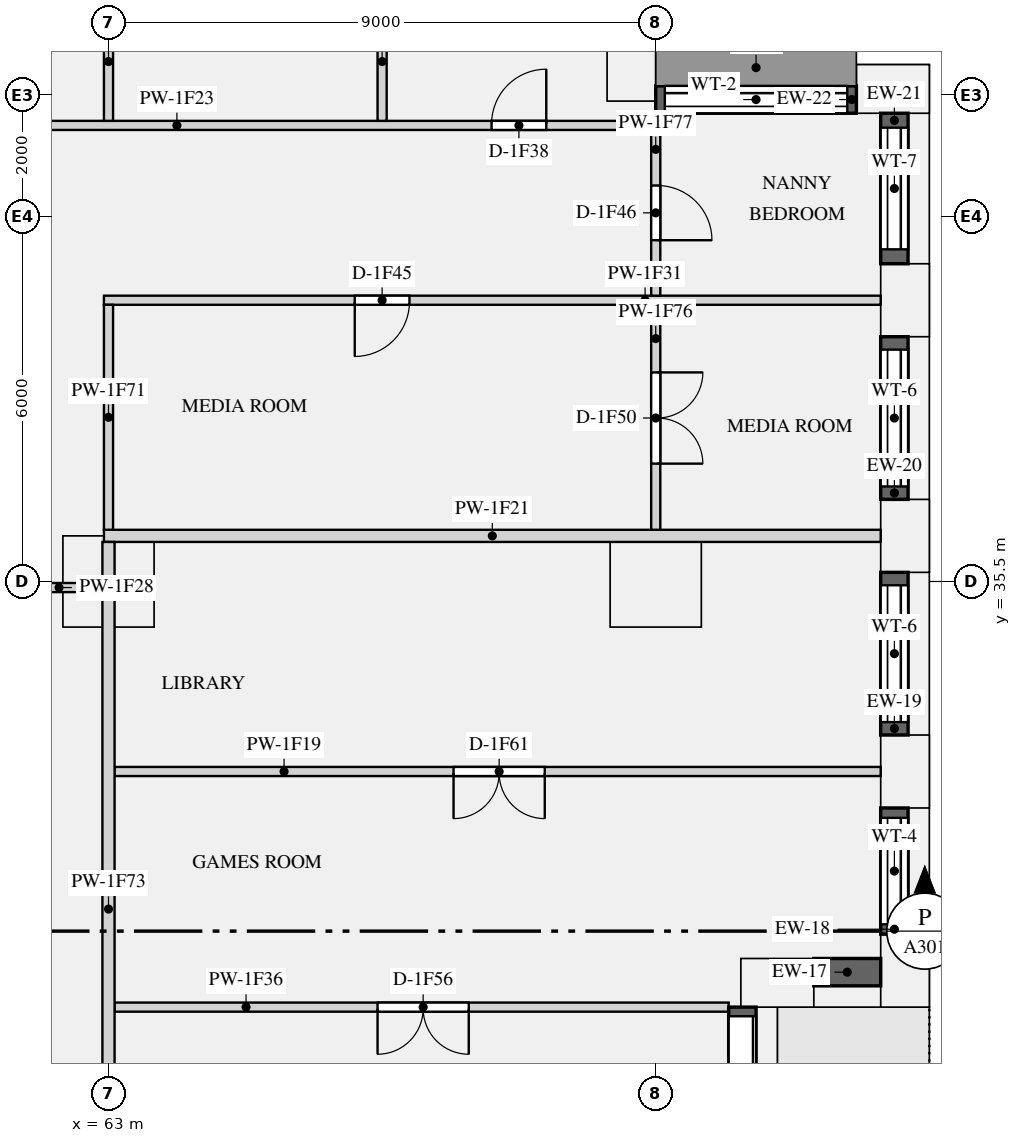
"""IFC4 building model, lengths in metres.
Left out: names, types, materials, properties, quantities, classifications, styles, units other than length and angle.
Written with IfcOpenShell. Run it as: python <this file> out.ifc"""

import sys

from ifc_helpers import new_model, si_unit, direction, frame, frame_2d, origin, origin_2d, place, context, subcontext, project, spatial, rectangle, extrude, element, fill, save


model = new_model("IFC4")
c1 = context("Model", 3, precision=1e-05, world=origin(), true_north=direction((0.0, 1.0)))
c2 = subcontext(c1, "Body", "Model", "MODEL_VIEW")
j1 = project(units=[si_unit("LENGTHUNIT", "METRE"), si_unit("PLANEANGLEUNIT", "RADIAN")], contexts=[c1])
p1 = place(None, origin())
s1 = spatial("IfcSite", under=j1, at=p1, CompositionType="ELEMENT")
p2 = place(p1, origin())
s2 = spatial("IfcBuilding", under=s1, at=p2, CompositionType="ELEMENT")
p3 = place(p2, frame((0.0, 0.0, 60.45)))
s3 = spatial("IfcBuildingStorey", under=s2, at=p3, CompositionType="ELEMENT", Elevation=60.45)
for number, where, z_axis, x_axis in (
    (1, (74.0, 28.9, 0.0), (0.0, 0.0, 1.0), (1.0, 0.0, 0.0)),
    (2, (76.1, 29.1, 0.0), (0.0, 0.0, 1.0), (0.0, 1.0, 0.0)),
    (3, (76.1, 32.375, 0.0), (0.0, 0.0, 1.0), (0.0, 1.0, 0.0)),
    (4, (76.1, 36.25, 0.0), (0.0, 0.0, 1.0), (0.0, 1.0, 0.0)),
    (5, (76.1, 40.125, 0.0), (0.0, 0.0, 1.0), (0.0, 1.0, 0.0)),
    (6, (75.9, 43.6, 0.0), (0.0, 0.0, 1.0), (-1.0, 0.0, 0.0)),
    (7, (71.6, 44.0, 0.0), (0.0, 0.0, 1.0), (0.0, 1.0, 0.0)),
):
    element("IfcColumn", number, at=place(p3, frame(where, z_axis=z_axis, x_axis=x_axis)), inside=s3, PredefinedType="USERDEFINED", context=c2, shape_type="SweptSolid", body=[
        extrude(rectangle(XDim=1.2, YDim=0.8, at=origin_2d()), origin(), (0.0, 0.0, 1.0), 3.15),
    ])
for number, where, z_axis, x_axis in (
    (8, (63.0, 35.5, 0.0), (0.0, 0.0, 1.0), (1.0, 0.0, 0.0)),
    (9, (72.0, 35.5, 0.0), (0.0, 0.0, 1.0), (1.0, 0.0, 0.0)),
):
    element("IfcColumn", number, at=place(p3, frame(where, z_axis=z_axis, x_axis=x_axis)), inside=s3, PredefinedType="COLUMN", context=c2, shape_type="SweptSolid", body=[
        extrude(rectangle(XDim=1.5, YDim=1.5, at=origin_2d()), origin(), (0.0, 0.0, 1.0), 3.15),
    ])
p4 = place(p3, frame((73.425, 25.1, 0.0), z_axis=(0.0, 0.0, 1.0), x_axis=(0.0, 1.0, 0.0)))
e10 = element("IfcWall", 10, at=p4, inside=s3, PredefinedType="SOLIDWALL", context=c2, shape_type="SweptSolid", body=[
    extrude(rectangle(XDim=3.4, YDim=0.45, at=frame_2d((1.7, 0.0))), origin(), (0.0, 0.0, 1.0), 2.83),
])
p5 = place(p4, frame((0.15, 0.0, 0.0)))
e11 = element("IfcOpeningElement", 11, at=p5, cuts=e10, PredefinedType="OPENING", context=c2, shape_type="SweptSolid", body=[
    extrude(rectangle(XDim=3.1, YDim=2.3, at=frame_2d((1.55, 1.15))), frame((0.0, 0.235, 0.0), z_axis=(0.0, -1.0, 0.0), x_axis=(1.0, 0.0, 0.0)), (0.0, 0.0, 1.0), 0.47),
])
p6 = place(p3, frame((74.6, 29.075, 0.9), z_axis=(0.0, 0.0, 1.0), x_axis=(1.0, 0.0, 0.0)))
e12 = element("IfcWall", 12, at=p6, inside=s3, PredefinedType="SOLIDWALL", context=c2, shape_type="SweptSolid", body=[
    extrude(rectangle(XDim=1.1, YDim=0.45, at=frame_2d((0.55, 0.0))), origin(), (0.0, 0.0, 1.0), 1.93),
])
p7 = place(p3, frame((75.925, 29.7, 0.9), z_axis=(0.0, 0.0, 1.0), x_axis=(0.0, 1.0, 0.0)))
e13 = element("IfcWall", 13, at=p7, inside=s3, PredefinedType="SOLIDWALL", context=c2, shape_type="SweptSolid", body=[
    extrude(rectangle(XDim=2.075, YDim=0.45, at=frame_2d((1.038, 0.0))), origin(), (0.0, 0.0, 1.0), 1.93),
])
p8 = place(p7, frame((0.163, 0.0, 0.15)))
e14 = element("IfcOpeningElement", 14, at=p8, cuts=e13, PredefinedType="OPENING", context=c2, shape_type="SweptSolid", body=[
    extrude(rectangle(XDim=1.75, YDim=1.5, at=frame_2d((0.875, 0.75))), frame((0.0, 0.235, 0.0), z_axis=(0.0, -1.0, 0.0), x_axis=(1.0, 0.0, 0.0)), (0.0, 0.0, 1.0), 0.47),
])
p9 = place(p3, frame((75.925, 32.975, 0.9), z_axis=(0.0, 0.0, 1.0), x_axis=(0.0, 1.0, 0.0)))
e15 = element("IfcWall", 15, at=p9, inside=s3, PredefinedType="SOLIDWALL", context=c2, shape_type="SweptSolid", body=[
    extrude(rectangle(XDim=2.675, YDim=0.45, at=frame_2d((1.337, 0.0))), origin(), (0.0, 0.0, 1.0), 1.93),
])
p10 = place(p9, frame((0.212, 0.0, 0.15)))
e16 = element("IfcOpeningElement", 16, at=p10, cuts=e15, PredefinedType="OPENING", context=c2, shape_type="SweptSolid", body=[
    extrude(rectangle(XDim=2.25, YDim=1.5, at=frame_2d((1.125, 0.75))), frame((0.0, 0.235, 0.0), z_axis=(0.0, -1.0, 0.0), x_axis=(1.0, 0.0, 0.0)), (0.0, 0.0, 1.0), 0.47),
])
p11 = place(p3, frame((75.925, 36.85, 0.9), z_axis=(0.0, 0.0, 1.0), x_axis=(0.0, 1.0, 0.0)))
e17 = element("IfcWall", 17, at=p11, inside=s3, PredefinedType="SOLIDWALL", context=c2, shape_type="SweptSolid", body=[
    extrude(rectangle(XDim=2.675, YDim=0.45, at=frame_2d((1.337, 0.0))), origin(), (0.0, 0.0, 1.0), 1.93),
])
p12 = place(p11, frame((0.212, 0.0, 0.15)))
e18 = element("IfcOpeningElement", 18, at=p12, cuts=e17, PredefinedType="OPENING", context=c2, shape_type="SweptSolid", body=[
    extrude(rectangle(XDim=2.25, YDim=1.5, at=frame_2d((1.125, 0.75))), frame((0.0, 0.235, 0.0), z_axis=(0.0, -1.0, 0.0), x_axis=(1.0, 0.0, 0.0)), (0.0, 0.0, 1.0), 0.47),
])
p13 = place(p3, frame((75.925, 40.725, 0.9), z_axis=(0.0, 0.0, 1.0), x_axis=(0.0, 1.0, 0.0)))
e19 = element("IfcWall", 19, at=p13, inside=s3, PredefinedType="SOLIDWALL", context=c2, shape_type="SweptSolid", body=[
    extrude(rectangle(XDim=2.475, YDim=0.45, at=frame_2d((1.237, 0.0))), origin(), (0.0, 0.0, 1.0), 1.93),
])
p14 = place(p13, frame((0.238, 0.0, 0.15)))
e20 = element("IfcOpeningElement", 20, at=p14, cuts=e19, PredefinedType="OPENING", context=c2, shape_type="SweptSolid", body=[
    extrude(rectangle(XDim=2.0, YDim=1.5, at=frame_2d((1.0, 0.75))), frame((0.0, 0.235, 0.0), z_axis=(0.0, -1.0, 0.0), x_axis=(1.0, 0.0, 0.0)), (0.0, 0.0, 1.0), 0.47),
])
p15 = place(p3, frame((75.3, 43.425, 0.9), z_axis=(0.0, 0.0, 1.0), x_axis=(-1.0, 0.0, 0.0)))
e21 = element("IfcWall", 21, at=p15, inside=s3, PredefinedType="SOLIDWALL", context=c2, shape_type="SweptSolid", body=[
    extrude(rectangle(XDim=3.3, YDim=0.45, at=frame_2d((1.65, 0.0))), origin(), (0.0, 0.0, 1.0), 1.93),
])
p16 = place(p15, frame((0.15, 0.0, 0.15)))
e22 = element("IfcOpeningElement", 22, at=p16, cuts=e21, PredefinedType="OPENING", context=c2, shape_type="SweptSolid", body=[
    extrude(rectangle(XDim=3.0, YDim=1.5, at=frame_2d((1.5, 0.75))), frame((0.0, 0.235, 0.0), z_axis=(0.0, -1.0, 0.0), x_axis=(1.0, 0.0, 0.0)), (0.0, 0.0, 1.0), 0.47),
])
p17 = place(p3, frame((63.1, 32.375, 0.0), z_axis=(0.0, 0.0, 1.0), x_axis=(1.0, 0.0, 0.0)))
e23 = element("IfcWall", 23, at=p17, inside=s3, PredefinedType="PARTITIONING", context=c2, shape_type="SweptSolid", body=[
    extrude(rectangle(XDim=12.6, YDim=0.15, at=frame_2d((6.3, 0.0))), origin(), (0.0, 0.0, 1.0), 2.83),
])
p18 = place(p17, frame((5.575, 0.0, 0.0)))
e24 = element("IfcOpeningElement", 24, at=p18, cuts=e23, PredefinedType="OPENING", context=c2, shape_type="SweptSolid", body=[
    extrude(rectangle(XDim=1.5, YDim=2.1, at=frame_2d((0.75, 1.05))), frame((0.0, 0.085, 0.0), z_axis=(0.0, -1.0, 0.0), x_axis=(1.0, 0.0, 0.0)), (0.0, 0.0, 1.0), 0.17),
])
p19 = place(p3, frame((62.925, 36.25, 0.0), z_axis=(0.0, 0.0, 1.0), x_axis=(1.0, 0.0, 0.0)))
e25 = element("IfcWall", 25, at=p19, inside=s3, PredefinedType="PARTITIONING", context=c2, shape_type="SweptSolid", body=[
    extrude(rectangle(XDim=12.775, YDim=0.2, at=frame_2d((6.387, 0.0))), origin(), (0.0, 0.0, 1.0), 2.83),
])
p20 = place(p3, frame((53.925, 43.0, 0.0), z_axis=(0.0, 0.0, 1.0), x_axis=(1.0, 0.0, 0.0)))
e26 = element("IfcWall", 26, at=p20, inside=s3, PredefinedType="PARTITIONING", context=c2, shape_type="SweptSolid", body=[
    extrude(rectangle(XDim=18.0, YDim=0.15, at=frame_2d((9.0, 0.0))), origin(), (0.0, 0.0, 1.0), 2.83),
])
p21 = place(p20, frame((15.375, 0.0, 0.0)))
e27 = element("IfcOpeningElement", 27, at=p21, cuts=e26, PredefinedType="OPENING", context=c2, shape_type="SweptSolid", body=[
    extrude(rectangle(XDim=0.9, YDim=2.1, at=frame_2d((0.45, 1.05))), frame((0.0, 0.085, 0.0), z_axis=(0.0, -1.0, 0.0), x_axis=(1.0, 0.0, 0.0)), (0.0, 0.0, 1.0), 0.17),
])
p22 = place(p20, frame((4.125, 0.0, 0.0)))
e28 = element("IfcOpeningElement", 28, at=p22, cuts=e26, PredefinedType="OPENING", context=c2, shape_type="SweptSolid", body=[
    extrude(rectangle(XDim=0.9, YDim=2.1, at=frame_2d((0.45, 1.05))), frame((0.0, 0.085, 0.0), z_axis=(0.0, -1.0, 0.0), x_axis=(1.0, 0.0, 0.0)), (0.0, 0.0, 1.0), 0.17),
])
p23 = place(p3, frame((59.8, 35.4, 0.0), z_axis=(0.0, 0.0, 1.0), x_axis=(1.0, 0.0, 0.0)))
e29 = element("IfcWall", 29, at=p23, inside=s3, PredefinedType="PARTITIONING", context=c2, shape_type="SweptSolid", body=[
    extrude(rectangle(XDim=3.1, YDim=0.15, at=frame_2d((1.55, 0.0))), origin(), (0.0, 0.0, 1.0), 2.83),
])
p24 = place(p23, frame((0.775, 0.0, 0.0)))
e30 = element("IfcOpeningElement", 30, at=p24, cuts=e29, PredefinedType="OPENING", context=c2, shape_type="SweptSolid", body=[
    extrude(rectangle(XDim=0.9, YDim=2.1, at=frame_2d((0.45, 1.05))), frame((0.0, 0.085, 0.0), z_axis=(0.0, -1.0, 0.0), x_axis=(1.0, 0.0, 0.0)), (0.0, 0.0, 1.0), 0.17),
])
p25 = place(p3, frame((62.925, 40.125, 0.0), z_axis=(0.0, 0.0, 1.0), x_axis=(1.0, 0.0, 0.0)))
e31 = element("IfcWall", 31, at=p25, inside=s3, PredefinedType="PARTITIONING", context=c2, shape_type="SweptSolid", body=[
    extrude(rectangle(XDim=12.775, YDim=0.15, at=frame_2d((6.387, 0.0))), origin(), (0.0, 0.0, 1.0), 2.83),
])
p26 = place(p25, frame((4.125, 0.0, 0.0)))
e32 = element("IfcOpeningElement", 32, at=p26, cuts=e31, PredefinedType="OPENING", context=c2, shape_type="SweptSolid", body=[
    extrude(rectangle(XDim=0.9, YDim=2.1, at=frame_2d((0.45, 1.05))), frame((0.0, 0.085, 0.0), z_axis=(0.0, -1.0, 0.0), x_axis=(1.0, 0.0, 0.0)), (0.0, 0.0, 1.0), 0.17),
])
p27 = place(p3, frame((63.1, 28.5, 0.0), z_axis=(0.0, 0.0, 1.0), x_axis=(1.0, 0.0, 0.0)))
e33 = element("IfcWall", 33, at=p27, inside=s3, PredefinedType="PARTITIONING", context=c2, shape_type="SweptSolid", body=[
    extrude(rectangle(XDim=10.1, YDim=0.15, at=frame_2d((5.05, 0.0))), origin(), (0.0, 0.0, 1.0), 2.83),
])
p28 = place(p27, frame((4.325, 0.0, 0.0)))
e34 = element("IfcOpeningElement", 34, at=p28, cuts=e33, PredefinedType="OPENING", context=c2, shape_type="SweptSolid", body=[
    extrude(rectangle(XDim=1.5, YDim=2.1, at=frame_2d((0.75, 1.05))), frame((0.0, 0.085, 0.0), z_axis=(0.0, -1.0, 0.0), x_axis=(1.0, 0.0, 0.0)), (0.0, 0.0, 1.0), 0.17),
])
p29 = place(p3, frame((63.0, 36.35, 0.0), z_axis=(0.0, 0.0, 1.0), x_axis=(0.0, 1.0, 0.0)))
e35 = element("IfcWall", 35, at=p29, inside=s3, PredefinedType="PARTITIONING", context=c2, shape_type="SweptSolid", body=[
    extrude(rectangle(XDim=3.7, YDim=0.15, at=frame_2d((1.85, 0.0))), origin(), (0.0, 0.0, 1.0), 2.83),
])
p30 = place(p3, frame((63.0, 43.075, 0.0), z_axis=(0.0, 0.0, 1.0), x_axis=(0.0, 1.0, 0.0)))
e36 = element("IfcWall", 36, at=p30, inside=s3, PredefinedType="PARTITIONING", context=c2, shape_type="SweptSolid", body=[
    extrude(rectangle(XDim=4.625, YDim=0.15, at=frame_2d((2.312, 0.0))), origin(), (0.0, 0.0, 1.0), 2.83),
])
p31 = place(p30, frame((1.95, 0.0, 0.0)))
e37 = element("IfcOpeningElement", 37, at=p31, cuts=e36, PredefinedType="OPENING", context=c2, shape_type="SweptSolid", body=[
    extrude(rectangle(XDim=0.8, YDim=2.1, at=frame_2d((0.4, 1.05))), frame((0.0, 0.085, 0.0), z_axis=(0.0, -1.0, 0.0), x_axis=(1.0, 0.0, 0.0)), (0.0, 0.0, 1.0), 0.17),
])
p32 = place(p3, frame((63.0, 24.075, 0.0), z_axis=(0.0, 0.0, 1.0), x_axis=(0.0, 1.0, 0.0)))
e38 = element("IfcWall", 38, at=p32, inside=s3, PredefinedType="PARTITIONING", context=c2, shape_type="SweptSolid", body=[
    extrude(rectangle(XDim=12.075, YDim=0.2, at=frame_2d((6.038, 0.0))), origin(), (0.0, 0.0, 1.0), 2.83),
])
p33 = place(p3, frame((72.0, 36.35, 0.0), z_axis=(0.0, 0.0, 1.0), x_axis=(0.0, 1.0, 0.0)))
e39 = element("IfcWall", 39, at=p33, inside=s3, PredefinedType="PARTITIONING", context=c2, shape_type="SweptSolid", body=[
    extrude(rectangle(XDim=3.7, YDim=0.15, at=frame_2d((1.85, 0.0))), origin(), (0.0, 0.0, 1.0), 2.83),
])
p34 = place(p33, frame((1.088, 0.0, 0.0)))
e40 = element("IfcOpeningElement", 40, at=p34, cuts=e39, PredefinedType="OPENING", context=c2, shape_type="SweptSolid", body=[
    extrude(rectangle(XDim=1.5, YDim=2.1, at=frame_2d((0.75, 1.05))), frame((0.0, 0.085, 0.0), z_axis=(0.0, -1.0, 0.0), x_axis=(1.0, 0.0, 0.0)), (0.0, 0.0, 1.0), 0.17),
])
p35 = place(p3, frame((72.0, 40.2, 0.0), z_axis=(0.0, 0.0, 1.0), x_axis=(0.0, 1.0, 0.0)))
e41 = element("IfcWall", 41, at=p35, inside=s3, PredefinedType="PARTITIONING", context=c2, shape_type="SweptSolid", body=[
    extrude(rectangle(XDim=3.0, YDim=0.15, at=frame_2d((1.5, 0.0))), origin(), (0.0, 0.0, 1.0), 2.83),
])
p36 = place(p35, frame((0.912, 0.0, 0.0)))
e42 = element("IfcOpeningElement", 42, at=p36, cuts=e41, PredefinedType="OPENING", context=c2, shape_type="SweptSolid", body=[
    extrude(rectangle(XDim=0.9, YDim=2.1, at=frame_2d((0.45, 1.05))), frame((0.0, 0.085, 0.0), z_axis=(0.0, -1.0, 0.0), x_axis=(1.0, 0.0, 0.0)), (0.0, 0.0, 1.0), 0.17),
])
p37 = place(p3, frame((67.5, 43.075, 0.0), z_axis=(0.0, 0.0, 1.0), x_axis=(0.0, 1.0, 0.0)))
e43 = element("IfcWall", 43, at=p37, inside=s3, PredefinedType="PARTITIONING", context=c2, shape_type="SweptSolid", body=[
    extrude(rectangle(XDim=4.625, YDim=0.15, at=frame_2d((2.312, 0.0))), origin(), (0.0, 0.0, 1.0), 2.83),
])
p38 = place(p37, frame((1.95, 0.0, 0.0)))
e44 = element("IfcOpeningElement", 44, at=p38, cuts=e43, PredefinedType="OPENING", context=c2, shape_type="SweptSolid", body=[
    extrude(rectangle(XDim=0.8, YDim=2.1, at=frame_2d((0.4, 1.05))), frame((0.0, 0.085, 0.0), z_axis=(0.0, -1.0, 0.0), x_axis=(1.0, 0.0, 0.0)), (0.0, 0.0, 1.0), 0.17),
])
p39 = place(p5, origin())
e45 = element("IfcDoor", 45, at=p39, inside=s3, OperationType="SLIDING_TO_LEFT", PredefinedType="DOOR", context=c2, shape_type="SweptSolid", body=[
    extrude(rectangle(XDim=3.1, YDim=2.3, at=frame_2d((1.55, 1.15))), frame((0.0, -0.07, 0.0), z_axis=(0.0, -1.0, 0.0), x_axis=(1.0, 0.0, 0.0)), (0.0, 0.0, 1.0), 0.05),
])
fill(e11, e45)
p40 = place(p8, origin())
e46 = element("IfcWindow", 46, at=p40, inside=s3, PartitioningType="SINGLE_PANEL", PredefinedType="WINDOW", context=c2, shape_type="SweptSolid", body=[
    extrude(rectangle(XDim=1.75, YDim=1.5, at=frame_2d((0.875, 0.75))), frame((0.0, -0.065, 0.0), z_axis=(0.0, -1.0, 0.0), x_axis=(1.0, 0.0, 0.0)), (0.0, 0.0, 1.0), 0.06),
])
fill(e14, e46)
p41 = place(p10, origin())
e47 = element("IfcWindow", 47, at=p41, inside=s3, PartitioningType="SINGLE_PANEL", PredefinedType="WINDOW", context=c2, shape_type="SweptSolid", body=[
    extrude(rectangle(XDim=2.25, YDim=1.5, at=frame_2d((1.125, 0.75))), frame((0.0, -0.065, 0.0), z_axis=(0.0, -1.0, 0.0), x_axis=(1.0, 0.0, 0.0)), (0.0, 0.0, 1.0), 0.06),
])
fill(e16, e47)
p42 = place(p12, origin())
e48 = element("IfcWindow", 48, at=p42, inside=s3, PartitioningType="SINGLE_PANEL", PredefinedType="WINDOW", context=c2, shape_type="SweptSolid", body=[
    extrude(rectangle(XDim=2.25, YDim=1.5, at=frame_2d((1.125, 0.75))), frame((0.0, -0.065, 0.0), z_axis=(0.0, -1.0, 0.0), x_axis=(1.0, 0.0, 0.0)), (0.0, 0.0, 1.0), 0.06),
])
fill(e18, e48)
p43 = place(p14, origin())
e49 = element("IfcWindow", 49, at=p43, inside=s3, PartitioningType="SINGLE_PANEL", PredefinedType="WINDOW", context=c2, shape_type="SweptSolid", body=[
    extrude(rectangle(XDim=2.0, YDim=1.5, at=frame_2d((1.0, 0.75))), frame((0.0, -0.065, 0.0), z_axis=(0.0, -1.0, 0.0), x_axis=(1.0, 0.0, 0.0)), (0.0, 0.0, 1.0), 0.06),
])
fill(e20, e49)
p44 = place(p16, origin())
e50 = element("IfcWindow", 50, at=p44, inside=s3, PartitioningType="SINGLE_PANEL", PredefinedType="WINDOW", context=c2, shape_type="SweptSolid", body=[
    extrude(rectangle(XDim=3.0, YDim=1.5, at=frame_2d((1.5, 0.75))), frame((0.0, -0.065, 0.0), z_axis=(0.0, -1.0, 0.0), x_axis=(1.0, 0.0, 0.0)), (0.0, 0.0, 1.0), 0.06),
])
fill(e22, e50)
p45 = place(p21, origin())
e51 = element("IfcDoor", 51, at=p45, inside=s3, OperationType="SINGLE_SWING_RIGHT", PredefinedType="DOOR", context=c2, shape_type="SweptSolid", body=[
    extrude(rectangle(XDim=0.9, YDim=2.1, at=frame_2d((0.45, 1.05))), frame((0.0, 0.025, 0.0), z_axis=(0.0, -1.0, 0.0), x_axis=(1.0, 0.0, 0.0)), (0.0, 0.0, 1.0), 0.05),
])
fill(e27, e51)
p46 = place(p26, frame((0.9, 0.0, 0.0), z_axis=(0.0, 0.0, 1.0), x_axis=(-1.0, 0.0, 0.0)))
e52 = element("IfcDoor", 52, at=p46, inside=s3, OperationType="SINGLE_SWING_RIGHT", PredefinedType="DOOR", context=c2, shape_type="SweptSolid", body=[
    extrude(rectangle(XDim=0.9, YDim=2.1, at=frame_2d((0.45, 1.05))), frame((0.0, 0.025, 0.0), z_axis=(0.0, -1.0, 0.0), x_axis=(1.0, 0.0, 0.0)), (0.0, 0.0, 1.0), 0.05),
])
fill(e32, e52)
p47 = place(p36, frame((0.9, 0.0, 0.0), z_axis=(0.0, 0.0, 1.0), x_axis=(-1.0, 0.0, 0.0)))
e53 = element("IfcDoor", 53, at=p47, inside=s3, OperationType="SINGLE_SWING_RIGHT", PredefinedType="DOOR", context=c2, shape_type="SweptSolid", body=[
    extrude(rectangle(XDim=0.9, YDim=2.1, at=frame_2d((0.45, 1.05))), frame((0.0, 0.025, 0.0), z_axis=(0.0, -1.0, 0.0), x_axis=(1.0, 0.0, 0.0)), (0.0, 0.0, 1.0), 0.05),
])
fill(e42, e53)
p48 = place(p34, frame((1.5, 0.0, 0.0), z_axis=(0.0, 0.0, 1.0), x_axis=(-1.0, 0.0, 0.0)))
e54 = element("IfcDoor", 54, at=p48, inside=s3, OperationType="DOUBLE_DOOR_SINGLE_SWING", PredefinedType="DOOR", context=c2, shape_type="SweptSolid", body=[
    extrude(rectangle(XDim=1.5, YDim=2.1, at=frame_2d((0.75, 1.05))), frame((0.0, 0.025, 0.0), z_axis=(0.0, -1.0, 0.0), x_axis=(1.0, 0.0, 0.0)), (0.0, 0.0, 1.0), 0.05),
])
fill(e40, e54)
p49 = place(p28, frame((1.5, 0.0, 0.0), z_axis=(0.0, 0.0, 1.0), x_axis=(-1.0, 0.0, 0.0)))
e55 = element("IfcDoor", 55, at=p49, inside=s3, OperationType="DOUBLE_DOOR_SINGLE_SWING", PredefinedType="DOOR", context=c2, shape_type="SweptSolid", body=[
    extrude(rectangle(XDim=1.5, YDim=2.1, at=frame_2d((0.75, 1.05))), frame((0.0, 0.025, 0.0), z_axis=(0.0, -1.0, 0.0), x_axis=(1.0, 0.0, 0.0)), (0.0, 0.0, 1.0), 0.05),
])
fill(e34, e55)
p50 = place(p18, frame((1.5, 0.0, 0.0), z_axis=(0.0, 0.0, 1.0), x_axis=(-1.0, 0.0, 0.0)))
e56 = element("IfcDoor", 56, at=p50, inside=s3, OperationType="DOUBLE_DOOR_SINGLE_SWING", PredefinedType="DOOR", context=c2, shape_type="SweptSolid", body=[
    extrude(rectangle(XDim=1.5, YDim=2.1, at=frame_2d((0.75, 1.05))), frame((0.0, 0.025, 0.0), z_axis=(0.0, -1.0, 0.0), x_axis=(1.0, 0.0, 0.0)), (0.0, 0.0, 1.0), 0.05),
])
fill(e24, e56)
save(model, sys.argv[1])
